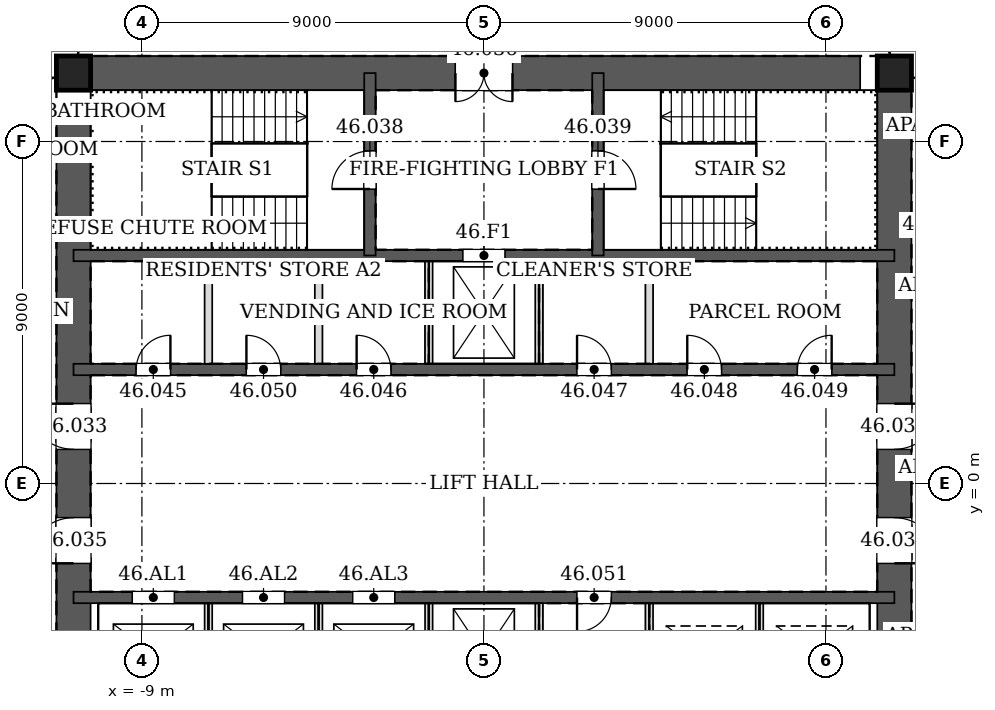
"""IFC4 building model, lengths in metres.
Left out: names, types, materials, properties, quantities, classifications, styles, units other than length and angle.
Written with IfcOpenShell. Run it as: python <this file> out.ifc"""

import sys

from ifc_helpers import new_model, si_unit, direction, frame, frame_2d, origin, origin_2d, place, context, subcontext, project, spatial, rectangle, hollow_rectangle, extrude, element, fill, save


model = new_model("IFC4")
c1 = context("Model", 3, precision=1e-05, world=origin(), true_north=direction((0.0, 1.0)))
c2 = subcontext(c1, "Body", "Model", "MODEL_VIEW")
j1 = project(units=[si_unit("LENGTHUNIT", "METRE"), si_unit("PLANEANGLEUNIT", "RADIAN")], contexts=[c1])
p1 = place(None, origin())
s1 = spatial("IfcSite", under=j1, at=p1, CompositionType="ELEMENT")
p2 = place(p1, origin())
s2 = spatial("IfcBuilding", under=s1, at=p2, CompositionType="ELEMENT")
p3 = place(p2, frame((0.0, 0.0, 204.0)))
s3 = spatial("IfcBuildingStorey", under=s2, at=p3, CompositionType="ELEMENT", Elevation=204.0)
for number, where, z_axis, x_axis in (
    (1, (10.8, 10.8, 0.0), (0.0, 0.0, 1.0), (1.0, 0.0, 0.0)),
    (2, (-10.8, 10.8, 0.0), (0.0, 0.0, 1.0), (1.0, 0.0, 0.0)),
):
    element("IfcColumn", number, at=place(p3, frame(where, z_axis=z_axis, x_axis=x_axis)), inside=s3, PredefinedType="COLUMN", context=c2, shape_type="SweptSolid", body=[
        extrude(hollow_rectangle(XDim=0.9, YDim=0.9, WallThickness=0.05, at=origin_2d()), origin(), (0.0, 0.0, 1.0), 3.4),
    ])
p4 = place(p3, frame((10.8, -10.8, 0.0), z_axis=(0.0, 0.0, 1.0), x_axis=(0.0, 1.0, 0.0)))
e3 = element("IfcWall", 3, at=p4, inside=s3, PredefinedType="SOLIDWALL", context=c2, shape_type="SweptSolid", body=[
    extrude(rectangle(XDim=21.6, YDim=0.9, at=frame_2d((10.8, 0.0))), origin(), (0.0, 0.0, 1.0), 3.4),
])
p5 = place(p4, frame((11.7, 0.0, 0.0)))
e4 = element("IfcOpeningElement", 4, at=p5, cuts=e3, PredefinedType="OPENING", context=c2, shape_type="SweptSolid", body=[
    extrude(rectangle(XDim=1.2, YDim=2.1, at=frame_2d((0.6, 1.05))), frame((0.0, 0.46, 0.0), z_axis=(0.0, -1.0, 0.0), x_axis=(1.0, 0.0, 0.0)), (0.0, 0.0, 1.0), 0.92),
])
p6 = place(p4, frame((8.7, 0.0, 0.0)))
e5 = element("IfcOpeningElement", 5, at=p6, cuts=e3, PredefinedType="OPENING", context=c2, shape_type="SweptSolid", body=[
    extrude(rectangle(XDim=1.2, YDim=2.1, at=frame_2d((0.6, 1.05))), frame((0.0, 0.46, 0.0), z_axis=(0.0, -1.0, 0.0), x_axis=(1.0, 0.0, 0.0)), (0.0, 0.0, 1.0), 0.92),
])
p7 = place(p3, frame((10.8, 10.8, 0.0), z_axis=(0.0, 0.0, 1.0), x_axis=(-1.0, 0.0, 0.0)))
e6 = element("IfcWall", 6, at=p7, inside=s3, PredefinedType="SOLIDWALL", context=c2, shape_type="SweptSolid", body=[
    extrude(rectangle(XDim=21.6, YDim=0.9, at=frame_2d((10.8, 0.0))), origin(), (0.0, 0.0, 1.0), 3.4),
])
p8 = place(p7, frame((10.05, 0.0, 0.0)))
e7 = element("IfcOpeningElement", 7, at=p8, cuts=e6, PredefinedType="OPENING", context=c2, shape_type="SweptSolid", body=[
    extrude(rectangle(XDim=1.5, YDim=2.1, at=frame_2d((0.75, 1.05))), frame((0.0, 0.46, 0.0), z_axis=(0.0, -1.0, 0.0), x_axis=(1.0, 0.0, 0.0)), (0.0, 0.0, 1.0), 0.92),
])
p9 = place(p3, frame((-10.8, 10.8, 0.0), z_axis=(0.0, 0.0, 1.0), x_axis=(0.0, -1.0, 0.0)))
e8 = element("IfcWall", 8, at=p9, inside=s3, PredefinedType="SOLIDWALL", context=c2, shape_type="SweptSolid", body=[
    extrude(rectangle(XDim=21.6, YDim=0.9, at=frame_2d((10.8, 0.0))), origin(), (0.0, 0.0, 1.0), 3.4),
])
p10 = place(p9, frame((8.7, 0.0, 0.0)))
e9 = element("IfcOpeningElement", 9, at=p10, cuts=e8, PredefinedType="OPENING", context=c2, shape_type="SweptSolid", body=[
    extrude(rectangle(XDim=1.2, YDim=2.1, at=frame_2d((0.6, 1.05))), frame((0.0, 0.46, 0.0), z_axis=(0.0, -1.0, 0.0), x_axis=(1.0, 0.0, 0.0)), (0.0, 0.0, 1.0), 0.92),
])
p11 = place(p9, frame((11.7, 0.0, 0.0)))
e10 = element("IfcOpeningElement", 10, at=p11, cuts=e8, PredefinedType="OPENING", context=c2, shape_type="SweptSolid", body=[
    extrude(rectangle(XDim=1.2, YDim=2.1, at=frame_2d((0.6, 1.05))), frame((0.0, 0.46, 0.0), z_axis=(0.0, -1.0, 0.0), x_axis=(1.0, 0.0, 0.0)), (0.0, 0.0, 1.0), 0.92),
])
p12 = place(p3, frame((-10.8, 3.0, 0.0), z_axis=(0.0, 0.0, 1.0), x_axis=(1.0, 0.0, 0.0)))
e11 = element("IfcWall", 11, at=p12, inside=s3, PredefinedType="SOLIDWALL", context=c2, shape_type="SweptSolid", body=[
    extrude(rectangle(XDim=21.6, YDim=0.3, at=frame_2d((10.8, 0.0))), origin(), (0.0, 0.0, 1.0), 3.4),
])
p13 = place(p12, frame((1.65, 0.0, 0.0)))
e12 = element("IfcOpeningElement", 12, at=p13, cuts=e11, PredefinedType="OPENING", context=c2, shape_type="SweptSolid", body=[
    extrude(rectangle(XDim=0.9, YDim=2.1, at=frame_2d((0.45, 1.05))), frame((0.0, 0.16, 0.0), z_axis=(0.0, -1.0, 0.0), x_axis=(1.0, 0.0, 0.0)), (0.0, 0.0, 1.0), 0.32),
])
p14 = place(p12, frame((7.45, 0.0, 0.0)))
e13 = element("IfcOpeningElement", 13, at=p14, cuts=e11, PredefinedType="OPENING", context=c2, shape_type="SweptSolid", body=[
    extrude(rectangle(XDim=0.9, YDim=2.1, at=frame_2d((0.45, 1.05))), frame((0.0, 0.16, 0.0), z_axis=(0.0, -1.0, 0.0), x_axis=(1.0, 0.0, 0.0)), (0.0, 0.0, 1.0), 0.32),
])
p15 = place(p12, frame((13.25, 0.0, 0.0)))
e14 = element("IfcOpeningElement", 14, at=p15, cuts=e11, PredefinedType="OPENING", context=c2, shape_type="SweptSolid", body=[
    extrude(rectangle(XDim=0.9, YDim=2.1, at=frame_2d((0.45, 1.05))), frame((0.0, 0.16, 0.0), z_axis=(0.0, -1.0, 0.0), x_axis=(1.0, 0.0, 0.0)), (0.0, 0.0, 1.0), 0.32),
])
p16 = place(p12, frame((16.15, 0.0, 0.0)))
e15 = element("IfcOpeningElement", 15, at=p16, cuts=e11, PredefinedType="OPENING", context=c2, shape_type="SweptSolid", body=[
    extrude(rectangle(XDim=0.9, YDim=2.1, at=frame_2d((0.45, 1.05))), frame((0.0, 0.16, 0.0), z_axis=(0.0, -1.0, 0.0), x_axis=(1.0, 0.0, 0.0)), (0.0, 0.0, 1.0), 0.32),
])
p17 = place(p12, frame((19.05, 0.0, 0.0)))
e16 = element("IfcOpeningElement", 16, at=p17, cuts=e11, PredefinedType="OPENING", context=c2, shape_type="SweptSolid", body=[
    extrude(rectangle(XDim=0.9, YDim=2.1, at=frame_2d((0.45, 1.05))), frame((0.0, 0.16, 0.0), z_axis=(0.0, -1.0, 0.0), x_axis=(1.0, 0.0, 0.0)), (0.0, 0.0, 1.0), 0.32),
])
p18 = place(p12, frame((4.55, 0.0, 0.0)))
e17 = element("IfcOpeningElement", 17, at=p18, cuts=e11, PredefinedType="OPENING", context=c2, shape_type="SweptSolid", body=[
    extrude(rectangle(XDim=0.9, YDim=2.1, at=frame_2d((0.45, 1.05))), frame((0.0, 0.16, 0.0), z_axis=(0.0, -1.0, 0.0), x_axis=(1.0, 0.0, 0.0)), (0.0, 0.0, 1.0), 0.32),
])
p19 = place(p3, frame((-10.8, 6.0, 0.0), z_axis=(0.0, 0.0, 1.0), x_axis=(1.0, 0.0, 0.0)))
e18 = element("IfcWall", 18, at=p19, inside=s3, PredefinedType="SOLIDWALL", context=c2, shape_type="SweptSolid", body=[
    extrude(rectangle(XDim=21.6, YDim=0.3, at=frame_2d((10.8, 0.0))), origin(), (0.0, 0.0, 1.0), 3.4),
])
p20 = place(p19, frame((10.25, 0.0, 0.0)))
e19 = element("IfcOpeningElement", 19, at=p20, cuts=e18, PredefinedType="OPENING", context=c2, shape_type="SweptSolid", body=[
    extrude(rectangle(XDim=1.1, YDim=2.1, at=frame_2d((0.55, 1.05))), frame((0.0, 0.16, 0.0), z_axis=(0.0, -1.0, 0.0), x_axis=(1.0, 0.0, 0.0)), (0.0, 0.0, 1.0), 0.32),
])
p21 = place(p3, frame((-3.0, 6.0, 0.0), z_axis=(0.0, 0.0, 1.0), x_axis=(0.0, 1.0, 0.0)))
e20 = element("IfcWall", 20, at=p21, inside=s3, PredefinedType="SOLIDWALL", context=c2, shape_type="SweptSolid", body=[
    extrude(rectangle(XDim=4.8, YDim=0.3, at=frame_2d((2.4, 0.0))), origin(), (0.0, 0.0, 1.0), 3.4),
])
p22 = place(p21, frame((1.75, 0.0, 0.0)))
e21 = element("IfcOpeningElement", 21, at=p22, cuts=e20, PredefinedType="OPENING", context=c2, shape_type="SweptSolid", body=[
    extrude(rectangle(XDim=1.0, YDim=2.1, at=frame_2d((0.5, 1.05))), frame((0.0, 0.16, 0.0), z_axis=(0.0, -1.0, 0.0), x_axis=(1.0, 0.0, 0.0)), (0.0, 0.0, 1.0), 0.32),
])
p23 = place(p3, frame((3.0, 6.0, 0.0), z_axis=(0.0, 0.0, 1.0), x_axis=(0.0, 1.0, 0.0)))
e22 = element("IfcWall", 22, at=p23, inside=s3, PredefinedType="SOLIDWALL", context=c2, shape_type="SweptSolid", body=[
    extrude(rectangle(XDim=4.8, YDim=0.3, at=frame_2d((2.4, 0.0))), origin(), (0.0, 0.0, 1.0), 3.4),
])
p24 = place(p23, frame((1.75, 0.0, 0.0)))
e23 = element("IfcOpeningElement", 23, at=p24, cuts=e22, PredefinedType="OPENING", context=c2, shape_type="SweptSolid", body=[
    extrude(rectangle(XDim=1.0, YDim=2.1, at=frame_2d((0.5, 1.05))), frame((0.0, 0.16, 0.0), z_axis=(0.0, -1.0, 0.0), x_axis=(1.0, 0.0, 0.0)), (0.0, 0.0, 1.0), 0.32),
])
p25 = place(p3, frame((-10.8, -3.0, 0.0), z_axis=(0.0, 0.0, 1.0), x_axis=(1.0, 0.0, 0.0)))
e24 = element("IfcWall", 24, at=p25, inside=s3, PredefinedType="SOLIDWALL", context=c2, shape_type="SweptSolid", body=[
    extrude(rectangle(XDim=21.6, YDim=0.3, at=frame_2d((10.8, 0.0))), origin(), (0.0, 0.0, 1.0), 3.4),
])
p26 = place(p25, frame((13.25, 0.0, 0.0)))
e25 = element("IfcOpeningElement", 25, at=p26, cuts=e24, PredefinedType="OPENING", context=c2, shape_type="SweptSolid", body=[
    extrude(rectangle(XDim=0.9, YDim=2.1, at=frame_2d((0.45, 1.05))), frame((0.0, 0.16, 0.0), z_axis=(0.0, -1.0, 0.0), x_axis=(1.0, 0.0, 0.0)), (0.0, 0.0, 1.0), 0.32),
])
p27 = place(p25, frame((1.55, 0.0, 0.0)))
e26 = element("IfcOpeningElement", 26, at=p27, cuts=e24, PredefinedType="OPENING", context=c2, shape_type="SweptSolid", body=[
    extrude(rectangle(XDim=1.1, YDim=2.1, at=frame_2d((0.55, 1.05))), frame((0.0, 0.16, 0.0), z_axis=(0.0, -1.0, 0.0), x_axis=(1.0, 0.0, 0.0)), (0.0, 0.0, 1.0), 0.32),
])
p28 = place(p25, frame((4.45, 0.0, 0.0)))
e27 = element("IfcOpeningElement", 27, at=p28, cuts=e24, PredefinedType="OPENING", context=c2, shape_type="SweptSolid", body=[
    extrude(rectangle(XDim=1.1, YDim=2.1, at=frame_2d((0.55, 1.05))), frame((0.0, 0.16, 0.0), z_axis=(0.0, -1.0, 0.0), x_axis=(1.0, 0.0, 0.0)), (0.0, 0.0, 1.0), 0.32),
])
p29 = place(p25, frame((7.35, 0.0, 0.0)))
e28 = element("IfcOpeningElement", 28, at=p29, cuts=e24, PredefinedType="OPENING", context=c2, shape_type="SweptSolid", body=[
    extrude(rectangle(XDim=1.1, YDim=2.1, at=frame_2d((0.55, 1.05))), frame((0.0, 0.16, 0.0), z_axis=(0.0, -1.0, 0.0), x_axis=(1.0, 0.0, 0.0)), (0.0, 0.0, 1.0), 0.32),
])
for number, where, z_axis, x_axis in (
    (29, (-7.25, 3.15, 0.0), (0.0, 0.0, 1.0), (0.0, 1.0, 0.0)),
    (30, (-4.35, 3.15, 0.0), (0.0, 0.0, 1.0), (0.0, 1.0, 0.0)),
    (31, (-1.45, 3.15, 0.0), (0.0, 0.0, 1.0), (0.0, 1.0, 0.0)),
    (32, (1.45, 3.15, 0.0), (0.0, 0.0, 1.0), (0.0, 1.0, 0.0)),
    (33, (4.35, 3.15, 0.0), (0.0, 0.0, 1.0), (0.0, 1.0, 0.0)),
):
    element("IfcWall", number, at=place(p3, frame(where, z_axis=z_axis, x_axis=x_axis)), inside=s3, PredefinedType="PARTITIONING", context=c2, shape_type="SweptSolid", body=[
        extrude(rectangle(XDim=2.7, YDim=0.2, at=frame_2d((1.35, 0.0))), origin(), (0.0, 0.0, 1.0), 3.2),
    ])
for number, where, z_axis, x_axis in (
    (34, (-7.25, -5.85, 0.0), (0.0, 0.0, 1.0), (0.0, 1.0, 0.0)),
    (35, (-4.35, -5.85, 0.0), (0.0, 0.0, 1.0), (0.0, 1.0, 0.0)),
    (36, (-1.45, -5.85, 0.0), (0.0, 0.0, 1.0), (0.0, 1.0, 0.0)),
):
    element("IfcWall", number, at=place(p3, frame(where, z_axis=z_axis, x_axis=x_axis)), inside=s3, PredefinedType="PARTITIONING", context=c2, shape_type="SweptSolid", body=[
        extrude(rectangle(XDim=2.7, YDim=0.2, at=frame_2d((1.35, 0.0))), origin(), (0.0, 0.0, 1.0), 3.4),
    ])
for number, where, z_axis, x_axis in (
    (37, (1.45, -5.85, 0.0), (0.0, 0.0, 1.0), (0.0, 1.0, 0.0)),
    (38, (4.35, -5.85, 0.0), (0.0, 0.0, 1.0), (0.0, 1.0, 0.0)),
):
    element("IfcWall", number, at=place(p3, frame(where, z_axis=z_axis, x_axis=x_axis)), inside=s3, PredefinedType="PARTITIONING", context=c2, shape_type="SweptSolid", body=[
        extrude(rectangle(XDim=2.7, YDim=0.2, at=frame_2d((1.35, 0.0))), origin(), (0.0, 0.0, 1.0), 3.2),
    ])
p30 = place(p3, frame((7.25, -5.85, 0.0), z_axis=(0.0, 0.0, 1.0), x_axis=(0.0, 1.0, 0.0)))
e39 = element("IfcWall", 39, at=p30, inside=s3, PredefinedType="PARTITIONING", context=c2, shape_type="SweptSolid", body=[
    extrude(rectangle(XDim=2.7, YDim=0.2, at=frame_2d((1.35, 0.0))), origin(), (0.0, 0.0, 1.0), 3.4),
])
p31 = place(p5, frame((1.2, 0.0, 0.0), z_axis=(0.0, 0.0, 1.0), x_axis=(-1.0, 0.0, 0.0)))
e40 = element("IfcDoor", 40, at=p31, inside=s3, OperationType="SINGLE_SWING_LEFT", PredefinedType="DOOR", context=c2, shape_type="SweptSolid", body=[
    extrude(rectangle(XDim=1.2, YDim=2.1, at=frame_2d((0.6, 1.05))), frame((0.0, 0.025, 0.0), z_axis=(0.0, -1.0, 0.0), x_axis=(1.0, 0.0, 0.0)), (0.0, 0.0, 1.0), 0.05),
])
fill(e4, e40)
p32 = place(p10, frame((1.2, 0.0, 0.0), z_axis=(0.0, 0.0, 1.0), x_axis=(-1.0, 0.0, 0.0)))
e41 = element("IfcDoor", 41, at=p32, inside=s3, OperationType="SINGLE_SWING_RIGHT", PredefinedType="DOOR", context=c2, shape_type="SweptSolid", body=[
    extrude(rectangle(XDim=1.2, YDim=2.1, at=frame_2d((0.6, 1.05))), frame((0.0, 0.025, 0.0), z_axis=(0.0, -1.0, 0.0), x_axis=(1.0, 0.0, 0.0)), (0.0, 0.0, 1.0), 0.05),
])
fill(e9, e41)
p33 = place(p6, frame((1.2, 0.0, 0.0), z_axis=(0.0, 0.0, 1.0), x_axis=(-1.0, 0.0, 0.0)))
e42 = element("IfcDoor", 42, at=p33, inside=s3, OperationType="SINGLE_SWING_RIGHT", PredefinedType="DOOR", context=c2, shape_type="SweptSolid", body=[
    extrude(rectangle(XDim=1.2, YDim=2.1, at=frame_2d((0.6, 1.05))), frame((0.0, 0.025, 0.0), z_axis=(0.0, -1.0, 0.0), x_axis=(1.0, 0.0, 0.0)), (0.0, 0.0, 1.0), 0.05),
])
fill(e5, e42)
p34 = place(p11, frame((1.2, 0.0, 0.0), z_axis=(0.0, 0.0, 1.0), x_axis=(-1.0, 0.0, 0.0)))
e43 = element("IfcDoor", 43, at=p34, inside=s3, OperationType="SINGLE_SWING_LEFT", PredefinedType="DOOR", context=c2, shape_type="SweptSolid", body=[
    extrude(rectangle(XDim=1.2, YDim=2.1, at=frame_2d((0.6, 1.05))), frame((0.0, 0.025, 0.0), z_axis=(0.0, -1.0, 0.0), x_axis=(1.0, 0.0, 0.0)), (0.0, 0.0, 1.0), 0.05),
])
fill(e10, e43)
p35 = place(p8, origin())
e44 = element("IfcDoor", 44, at=p35, inside=s3, OperationType="DOUBLE_DOOR_SINGLE_SWING", PredefinedType="DOOR", context=c2, shape_type="SweptSolid", body=[
    extrude(rectangle(XDim=1.5, YDim=2.1, at=frame_2d((0.75, 1.05))), frame((0.0, 0.025, 0.0), z_axis=(0.0, -1.0, 0.0), x_axis=(1.0, 0.0, 0.0)), (0.0, 0.0, 1.0), 0.05),
])
fill(e7, e44)
p36 = place(p22, origin())
e45 = element("IfcDoor", 45, at=p36, inside=s3, OperationType="SINGLE_SWING_LEFT", PredefinedType="DOOR", context=c2, shape_type="SweptSolid", body=[
    extrude(rectangle(XDim=1.0, YDim=2.1, at=frame_2d((0.5, 1.05))), frame((0.0, 0.025, 0.0), z_axis=(0.0, -1.0, 0.0), x_axis=(1.0, 0.0, 0.0)), (0.0, 0.0, 1.0), 0.05),
])
fill(e21, e45)
p37 = place(p24, frame((1.0, 0.0, 0.0), z_axis=(0.0, 0.0, 1.0), x_axis=(-1.0, 0.0, 0.0)))
e46 = element("IfcDoor", 46, at=p37, inside=s3, OperationType="SINGLE_SWING_RIGHT", PredefinedType="DOOR", context=c2, shape_type="SweptSolid", body=[
    extrude(rectangle(XDim=1.0, YDim=2.1, at=frame_2d((0.5, 1.05))), frame((0.0, 0.025, 0.0), z_axis=(0.0, -1.0, 0.0), x_axis=(1.0, 0.0, 0.0)), (0.0, 0.0, 1.0), 0.05),
])
fill(e23, e46)
p38 = place(p13, origin())
e47 = element("IfcDoor", 47, at=p38, inside=s3, OperationType="SINGLE_SWING_RIGHT", PredefinedType="DOOR", context=c2, shape_type="SweptSolid", body=[
    extrude(rectangle(XDim=0.9, YDim=2.1, at=frame_2d((0.45, 1.05))), frame((0.0, 0.025, 0.0), z_axis=(0.0, -1.0, 0.0), x_axis=(1.0, 0.0, 0.0)), (0.0, 0.0, 1.0), 0.05),
])
fill(e12, e47)
p39 = place(p14, origin())
e48 = element("IfcDoor", 48, at=p39, inside=s3, OperationType="SINGLE_SWING_LEFT", PredefinedType="DOOR", context=c2, shape_type="SweptSolid", body=[
    extrude(rectangle(XDim=0.9, YDim=2.1, at=frame_2d((0.45, 1.05))), frame((0.0, 0.025, 0.0), z_axis=(0.0, -1.0, 0.0), x_axis=(1.0, 0.0, 0.0)), (0.0, 0.0, 1.0), 0.05),
])
fill(e13, e48)
p40 = place(p15, origin())
e49 = element("IfcDoor", 49, at=p40, inside=s3, OperationType="SINGLE_SWING_LEFT", PredefinedType="DOOR", context=c2, shape_type="SweptSolid", body=[
    extrude(rectangle(XDim=0.9, YDim=2.1, at=frame_2d((0.45, 1.05))), frame((0.0, 0.025, 0.0), z_axis=(0.0, -1.0, 0.0), x_axis=(1.0, 0.0, 0.0)), (0.0, 0.0, 1.0), 0.05),
])
fill(e14, e49)
p41 = place(p16, origin())
e50 = element("IfcDoor", 50, at=p41, inside=s3, OperationType="SINGLE_SWING_LEFT", PredefinedType="DOOR", context=c2, shape_type="SweptSolid", body=[
    extrude(rectangle(XDim=0.9, YDim=2.1, at=frame_2d((0.45, 1.05))), frame((0.0, 0.025, 0.0), z_axis=(0.0, -1.0, 0.0), x_axis=(1.0, 0.0, 0.0)), (0.0, 0.0, 1.0), 0.05),
])
fill(e15, e50)
p42 = place(p17, origin())
e51 = element("IfcDoor", 51, at=p42, inside=s3, OperationType="SINGLE_SWING_RIGHT", PredefinedType="DOOR", context=c2, shape_type="SweptSolid", body=[
    extrude(rectangle(XDim=0.9, YDim=2.1, at=frame_2d((0.45, 1.05))), frame((0.0, 0.025, 0.0), z_axis=(0.0, -1.0, 0.0), x_axis=(1.0, 0.0, 0.0)), (0.0, 0.0, 1.0), 0.05),
])
fill(e16, e51)
p43 = place(p18, origin())
e52 = element("IfcDoor", 52, at=p43, inside=s3, OperationType="SINGLE_SWING_LEFT", PredefinedType="DOOR", context=c2, shape_type="SweptSolid", body=[
    extrude(rectangle(XDim=0.9, YDim=2.1, at=frame_2d((0.45, 1.05))), frame((0.0, 0.025, 0.0), z_axis=(0.0, -1.0, 0.0), x_axis=(1.0, 0.0, 0.0)), (0.0, 0.0, 1.0), 0.05),
])
fill(e17, e52)
p44 = place(p26, frame((0.9, 0.0, 0.0), z_axis=(0.0, 0.0, 1.0), x_axis=(-1.0, 0.0, 0.0)))
e53 = element("IfcDoor", 53, at=p44, inside=s3, OperationType="SINGLE_SWING_RIGHT", PredefinedType="DOOR", context=c2, shape_type="SweptSolid", body=[
    extrude(rectangle(XDim=0.9, YDim=2.1, at=frame_2d((0.45, 1.05))), frame((0.0, 0.025, 0.0), z_axis=(0.0, -1.0, 0.0), x_axis=(1.0, 0.0, 0.0)), (0.0, 0.0, 1.0), 0.05),
])
fill(e25, e53)
p45 = place(p20, origin())
e54 = element("IfcDoor", 54, at=p45, inside=s3, OperationType="DOUBLE_DOOR_SLIDING", PredefinedType="DOOR", context=c2, shape_type="SweptSolid", body=[
    extrude(rectangle(XDim=1.1, YDim=2.1, at=frame_2d((0.55, 1.05))), frame((0.0, 0.025, 0.0), z_axis=(0.0, -1.0, 0.0), x_axis=(1.0, 0.0, 0.0)), (0.0, 0.0, 1.0), 0.05),
])
fill(e19, e54)
p46 = place(p27, origin())
e55 = element("IfcDoor", 55, at=p46, inside=s3, OperationType="DOUBLE_DOOR_SLIDING", PredefinedType="DOOR", context=c2, shape_type="SweptSolid", body=[
    extrude(rectangle(XDim=1.1, YDim=2.1, at=frame_2d((0.55, 1.05))), frame((0.0, 0.025, 0.0), z_axis=(0.0, -1.0, 0.0), x_axis=(1.0, 0.0, 0.0)), (0.0, 0.0, 1.0), 0.05),
])
fill(e26, e55)
p47 = place(p28, origin())
e56 = element("IfcDoor", 56, at=p47, inside=s3, OperationType="DOUBLE_DOOR_SLIDING", PredefinedType="DOOR", context=c2, shape_type="SweptSolid", body=[
    extrude(rectangle(XDim=1.1, YDim=2.1, at=frame_2d((0.55, 1.05))), frame((0.0, 0.025, 0.0), z_axis=(0.0, -1.0, 0.0), x_axis=(1.0, 0.0, 0.0)), (0.0, 0.0, 1.0), 0.05),
])
fill(e27, e56)
p48 = place(p29, origin())
e57 = element("IfcDoor", 57, at=p48, inside=s3, OperationType="DOUBLE_DOOR_SLIDING", PredefinedType="DOOR", context=c2, shape_type="SweptSolid", body=[
    extrude(rectangle(XDim=1.1, YDim=2.1, at=frame_2d((0.55, 1.05))), frame((0.0, 0.025, 0.0), z_axis=(0.0, -1.0, 0.0), x_axis=(1.0, 0.0, 0.0)), (0.0, 0.0, 1.0), 0.05),
])
fill(e28, e57)
save(model, sys.argv[1])
